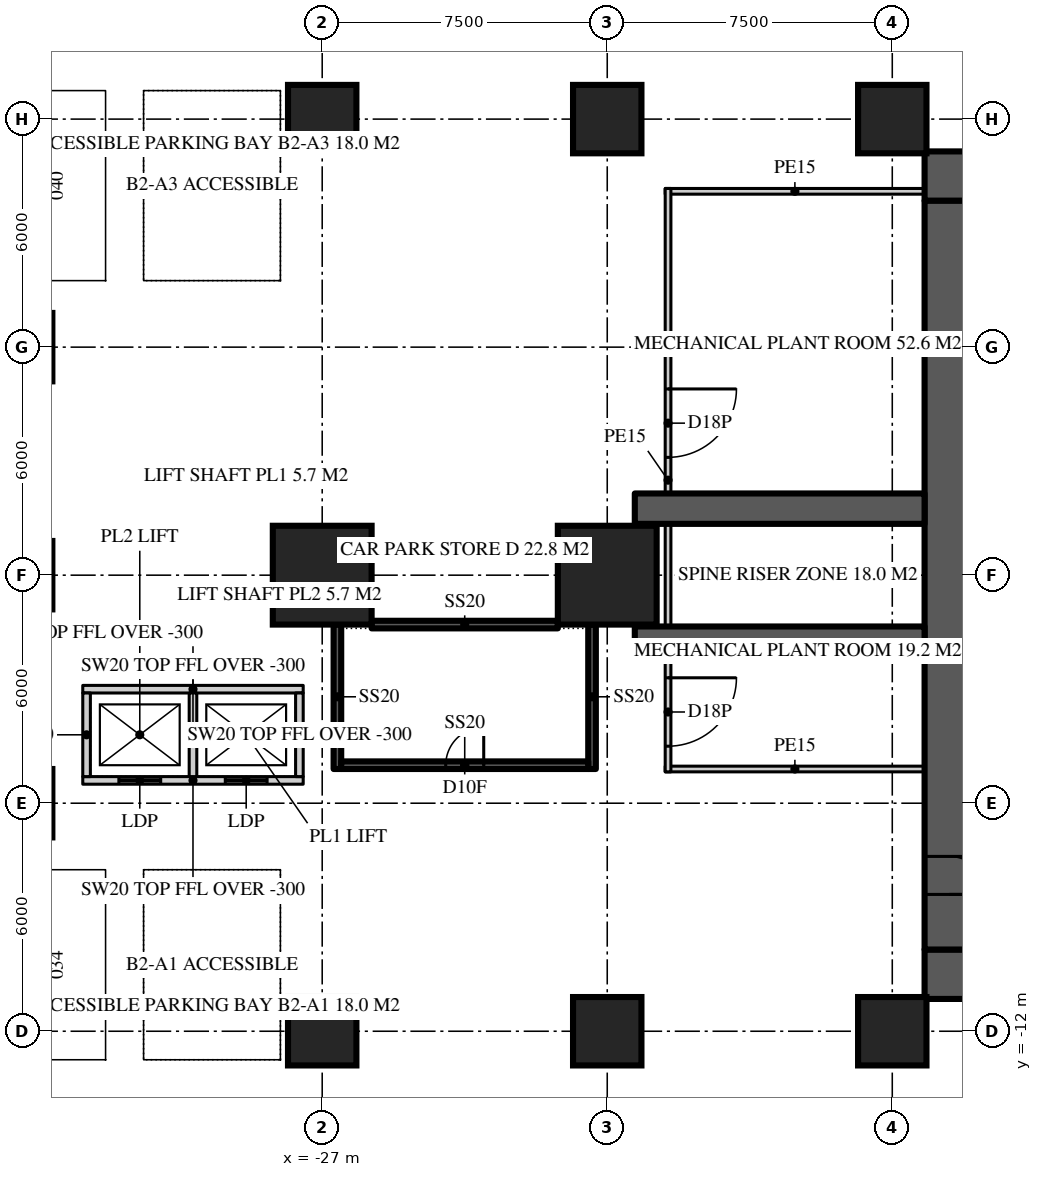
"""IFC4 building model, lengths in metres.
Left out: names, types, materials, properties, quantities, classifications, styles, units other than length and angle.
Written with IfcOpenShell. Run it as: python <this file> out.ifc"""

import sys

from ifc_helpers import new_model, si_unit, direction, frame, frame_2d, origin, origin_2d, place, context, subcontext, project, spatial, rectangle, extrude, element, fill, save


model = new_model("IFC4")
c1 = context("Model", 3, precision=1e-05, world=origin(), true_north=direction((0.0, 1.0)))
c2 = subcontext(c1, "Body", "Model", "MODEL_VIEW")
j1 = project(units=[si_unit("LENGTHUNIT", "METRE"), si_unit("PLANEANGLEUNIT", "RADIAN")], contexts=[c1])
p1 = place(None, origin())
s1 = spatial("IfcSite", under=j1, at=p1, CompositionType="ELEMENT")
p2 = place(p1, origin())
s2 = spatial("IfcBuilding", under=s1, at=p2, CompositionType="ELEMENT")
p3 = place(p2, frame((0.0, 0.0, -10.0)))
s3 = spatial("IfcBuildingStorey", under=s2, at=p3, CompositionType="ELEMENT", Elevation=-10.0)
p4 = place(p3, frame((-11.15, 10.5, 0.0), z_axis=(0.0, 0.0, 1.0), x_axis=(1.0, 0.0, 0.0)))
e1 = element("IfcWall", 1, at=p4, inside=s3, PredefinedType="SHEAR", context=c2, shape_type="SweptSolid", body=[
    extrude(rectangle(XDim=22.3, YDim=1.3, at=frame_2d((11.15, 0.0))), origin(), (0.0, 0.0, 1.0), 5.0),
])
p5 = place(p4, frame((4.25, 0.0, 0.0)))
e2 = element("IfcOpeningElement", 2, at=p5, cuts=e1, PredefinedType="OPENING", context=c2, shape_type="SweptSolid", body=[
    extrude(rectangle(XDim=1.8, YDim=2.2, at=frame_2d((0.9, 1.1))), frame((0.0, 0.66, 0.0), z_axis=(0.0, -1.0, 0.0), x_axis=(1.0, 0.0, 0.0)), (0.0, 0.0, 1.0), 1.32),
])
p6 = place(p4, frame((16.25, 0.0, 0.0)))
e3 = element("IfcOpeningElement", 3, at=p6, cuts=e1, PredefinedType="OPENING", context=c2, shape_type="SweptSolid", body=[
    extrude(rectangle(XDim=1.8, YDim=2.2, at=frame_2d((0.9, 1.1))), frame((0.0, 0.66, 0.0), z_axis=(0.0, -1.0, 0.0), x_axis=(1.0, 0.0, 0.0)), (0.0, 0.0, 1.0), 1.32),
])
p7 = place(p3, frame((11.15, -10.5, 0.0), z_axis=(0.0, 0.0, 1.0), x_axis=(-1.0, 0.0, 0.0)))
e4 = element("IfcWall", 4, at=p7, inside=s3, PredefinedType="SHEAR", context=c2, shape_type="SweptSolid", body=[
    extrude(rectangle(XDim=22.3, YDim=1.3, at=frame_2d((11.15, 0.0))), origin(), (0.0, 0.0, 1.0), 5.0),
])
p8 = place(p7, frame((16.25, 0.0, 0.0)))
e5 = element("IfcOpeningElement", 5, at=p8, cuts=e4, PredefinedType="OPENING", context=c2, shape_type="SweptSolid", body=[
    extrude(rectangle(XDim=1.8, YDim=2.2, at=frame_2d((0.9, 1.1))), frame((0.0, 0.66, 0.0), z_axis=(0.0, -1.0, 0.0), x_axis=(1.0, 0.0, 0.0)), (0.0, 0.0, 1.0), 1.32),
])
p9 = place(p7, frame((4.25, 0.0, 0.0)))
e6 = element("IfcOpeningElement", 6, at=p9, cuts=e4, PredefinedType="OPENING", context=c2, shape_type="SweptSolid", body=[
    extrude(rectangle(XDim=1.8, YDim=2.2, at=frame_2d((0.9, 1.1))), frame((0.0, 0.66, 0.0), z_axis=(0.0, -1.0, 0.0), x_axis=(1.0, 0.0, 0.0)), (0.0, 0.0, 1.0), 1.32),
])
p10 = place(p3, frame((-10.5, 9.85, 0.0), z_axis=(0.0, 0.0, 1.0), x_axis=(0.0, -1.0, 0.0)))
e7 = element("IfcWall", 7, at=p10, inside=s3, PredefinedType="SHEAR", context=c2, shape_type="SweptSolid", body=[
    extrude(rectangle(XDim=19.7, YDim=1.3, at=frame_2d((9.85, 0.0))), origin(), (0.0, 0.0, 1.0), 5.0),
])
p11 = place(p10, frame((17.25, 0.0, 0.0)))
e8 = element("IfcOpeningElement", 8, at=p11, cuts=e7, PredefinedType="OPENING", context=c2, shape_type="SweptSolid", body=[
    extrude(rectangle(XDim=1.0, YDim=2.2, at=frame_2d((0.5, 1.1))), frame((0.0, 0.66, 0.0), z_axis=(0.0, -1.0, 0.0), x_axis=(1.0, 0.0, 0.0)), (0.0, 0.0, 1.0), 1.32),
])
for number, where, z_axis, x_axis in (
    (9, (-11.15, 1.75, 0.0), (0.0, 0.0, 1.0), (-1.0, 0.0, 0.0)),
    (10, (-11.15, -1.75, 0.0), (0.0, 0.0, 1.0), (-1.0, 0.0, 0.0)),
):
    element("IfcWall", number, at=place(p3, frame(where, z_axis=z_axis, x_axis=x_axis)), inside=s3, PredefinedType="SHEAR", context=c2, shape_type="SweptSolid", body=[
        extrude(rectangle(XDim=7.625, YDim=0.8, at=frame_2d((3.812, 0.0))), origin(), (0.0, 0.0, 1.0), 5.0),
    ])
for number, where, z_axis, x_axis in (
    (11, (-27.0, -12.0, 0.0), (0.0, 0.0, 1.0), (1.0, 0.0, 0.0)),
    (12, (-19.5, -12.0, 0.0), (0.0, 0.0, 1.0), (1.0, 0.0, 0.0)),
    (13, (-12.0, -12.0, 0.0), (0.0, 0.0, 1.0), (1.0, 0.0, 0.0)),
    (14, (-35.0, -6.0, 0.0), (0.0, 0.0, 1.0), (1.0, 0.0, 0.0)),
    (15, (-35.0, 0.0, 0.0), (0.0, 0.0, 1.0), (1.0, 0.0, 0.0)),
):
    element("IfcColumn", number, at=place(p3, frame(where, z_axis=z_axis, x_axis=x_axis)), inside=s3, PredefinedType="COLUMN", context=c2, shape_type="SweptSolid", body=[
        extrude(rectangle(XDim=1.8, YDim=1.8, at=origin_2d()), origin(), (0.0, 0.0, 1.0), 5.0),
    ])
for number, where, z_axis, x_axis in (
    (16, (-27.0, 0.0, 0.0), (0.0, 0.0, 1.0), (1.0, 0.0, 0.0)),
    (17, (-19.5, 0.0, 0.0), (0.0, 0.0, 1.0), (1.0, 0.0, 0.0)),
):
    element("IfcColumn", number, at=place(p3, frame(where, z_axis=z_axis, x_axis=x_axis)), inside=s3, PredefinedType="COLUMN", context=c2, shape_type="SweptSolid", body=[
        extrude(rectangle(XDim=2.6, YDim=2.6, at=origin_2d()), origin(), (0.0, 0.0, 1.0), 5.0),
    ])
for number, where, z_axis, x_axis in (
    (18, (-35.0, 6.0, 0.0), (0.0, 0.0, 1.0), (1.0, 0.0, 0.0)),
    (19, (-27.0, 12.0, 0.0), (0.0, 0.0, 1.0), (1.0, 0.0, 0.0)),
    (20, (-19.5, 12.0, 0.0), (0.0, 0.0, 1.0), (1.0, 0.0, 0.0)),
    (21, (-12.0, 12.0, 0.0), (0.0, 0.0, 1.0), (1.0, 0.0, 0.0)),
):
    element("IfcColumn", number, at=place(p3, frame(where, z_axis=z_axis, x_axis=x_axis)), inside=s3, PredefinedType="COLUMN", context=c2, shape_type="SweptSolid", body=[
        extrude(rectangle(XDim=1.8, YDim=1.8, at=origin_2d()), origin(), (0.0, 0.0, 1.0), 5.0),
    ])
for number, where, z_axis, x_axis in (
    (22, (-11.15, 10.1, 0.0), (0.0, 0.0, 1.0), (-1.0, 0.0, 0.0)),
    (23, (-11.15, -5.1, 0.0), (0.0, 0.0, 1.0), (-1.0, 0.0, 0.0)),
):
    element("IfcWall", number, at=place(p3, frame(where, z_axis=z_axis, x_axis=x_axis)), inside=s3, PredefinedType="SOLIDWALL", context=c2, shape_type="SweptSolid", body=[
        extrude(rectangle(XDim=6.825, YDim=0.15, at=frame_2d((3.413, 0.0))), origin(), (0.0, 0.0, 1.0), 4.7),
    ])
p12 = place(p3, frame((-17.9, 10.175, 0.0), z_axis=(0.0, 0.0, 1.0), x_axis=(0.0, -1.0, 0.0)))
e24 = element("IfcWall", 24, at=p12, inside=s3, PredefinedType="SOLIDWALL", context=c2, shape_type="SweptSolid", body=[
    extrude(rectangle(XDim=15.35, YDim=0.15, at=frame_2d((7.675, 0.0))), origin(), (0.0, 0.0, 1.0), 4.7),
])
p13 = place(p12, frame((5.275, 0.0, 0.0)))
e25 = element("IfcOpeningElement", 25, at=p13, cuts=e24, PredefinedType="OPENING", context=c2, shape_type="SweptSolid", body=[
    extrude(rectangle(XDim=1.8, YDim=2.4, at=frame_2d((0.9, 1.2))), frame((0.0, 0.085, 0.0), z_axis=(0.0, -1.0, 0.0), x_axis=(1.0, 0.0, 0.0)), (0.0, 0.0, 1.0), 0.17),
])
p14 = place(p12, frame((12.875, 0.0, 0.0)))
e26 = element("IfcOpeningElement", 26, at=p14, cuts=e24, PredefinedType="OPENING", context=c2, shape_type="SweptSolid", body=[
    extrude(rectangle(XDim=1.8, YDim=2.4, at=frame_2d((0.9, 1.2))), frame((0.0, 0.085, 0.0), z_axis=(0.0, -1.0, 0.0), x_axis=(1.0, 0.0, 0.0)), (0.0, 0.0, 1.0), 0.17),
])
p15 = place(p3, frame((-27.5, -3.0, 0.0), z_axis=(0.0, 0.0, 1.0), x_axis=(-1.0, 0.0, 0.0)))
e27 = element("IfcWall", 27, at=p15, inside=s3, PredefinedType="SOLIDWALL", context=c2, shape_type="SweptSolid", body=[
    extrude(rectangle(XDim=5.8, YDim=0.2, at=frame_2d((2.9, 0.0))), origin(), (0.0, 0.0, 1.0), 4.7),
])
p16 = place(p3, frame((-33.3, -5.4, 0.0), z_axis=(0.0, 0.0, 1.0), x_axis=(1.0, 0.0, 0.0)))
e28 = element("IfcWall", 28, at=p16, inside=s3, PredefinedType="SOLIDWALL", context=c2, shape_type="SweptSolid", body=[
    extrude(rectangle(XDim=5.8, YDim=0.2, at=frame_2d((2.9, 0.0))), origin(), (0.0, 0.0, 1.0), 4.7),
])
p17 = place(p16, frame((3.75, 0.0, 0.0)))
e29 = element("IfcOpeningElement", 29, at=p17, cuts=e28, PredefinedType="OPENING", context=c2, shape_type="SweptSolid", body=[
    extrude(rectangle(XDim=1.1, YDim=2.2, at=frame_2d((0.55, 1.1))), frame((0.0, 0.11, 0.0), z_axis=(0.0, -1.0, 0.0), x_axis=(1.0, 0.0, 0.0)), (0.0, 0.0, 1.0), 0.22),
])
p18 = place(p16, frame((0.95, 0.0, 0.0)))
e30 = element("IfcOpeningElement", 30, at=p18, cuts=e28, PredefinedType="OPENING", context=c2, shape_type="SweptSolid", body=[
    extrude(rectangle(XDim=1.1, YDim=2.2, at=frame_2d((0.55, 1.1))), frame((0.0, 0.11, 0.0), z_axis=(0.0, -1.0, 0.0), x_axis=(1.0, 0.0, 0.0)), (0.0, 0.0, 1.0), 0.22),
])
for number, where, z_axis, x_axis in (
    (31, (-27.6, -3.1, 0.0), (0.0, 0.0, 1.0), (0.0, -1.0, 0.0)),
    (32, (-30.4, -3.1, 0.0), (0.0, 0.0, 1.0), (0.0, -1.0, 0.0)),
    (33, (-33.2, -3.1, 0.0), (0.0, 0.0, 1.0), (0.0, -1.0, 0.0)),
):
    element("IfcWall", number, at=place(p3, frame(where, z_axis=z_axis, x_axis=x_axis)), inside=s3, PredefinedType="SOLIDWALL", context=c2, shape_type="SweptSolid", body=[
        extrude(rectangle(XDim=2.2, YDim=0.2, at=frame_2d((1.1, 0.0))), origin(), (0.0, 0.0, 1.0), 4.7),
    ])
for number, where, z_axis, x_axis in (
    (34, (-19.9, -1.3, 0.0), (0.0, 0.0, 1.0), (0.0, -1.0, 0.0)),
    (35, (-26.6, -5.1, 0.0), (0.0, 0.0, 1.0), (0.0, 1.0, 0.0)),
):
    element("IfcWall", number, at=place(p3, frame(where, z_axis=z_axis, x_axis=x_axis)), inside=s3, PredefinedType="SOLIDWALL", context=c2, shape_type="SweptSolid", body=[
        extrude(rectangle(XDim=3.8, YDim=0.2, at=frame_2d((1.9, 0.0))), origin(), (0.0, 0.0, 1.0), 4.7),
    ])
p19 = place(p3, frame((-20.8, -1.3, 0.0), z_axis=(0.0, 0.0, 1.0), x_axis=(-1.0, 0.0, 0.0)))
e36 = element("IfcWall", 36, at=p19, inside=s3, PredefinedType="SOLIDWALL", context=c2, shape_type="SweptSolid", body=[
    extrude(rectangle(XDim=4.9, YDim=0.2, at=frame_2d((2.45, 0.0))), origin(), (0.0, 0.0, 1.0), 4.7),
])
p20 = place(p3, frame((-26.5, -5.0, 0.0), z_axis=(0.0, 0.0, 1.0), x_axis=(1.0, 0.0, 0.0)))
e37 = element("IfcWall", 37, at=p20, inside=s3, PredefinedType="SOLIDWALL", context=c2, shape_type="SweptSolid", body=[
    extrude(rectangle(XDim=6.5, YDim=0.2, at=frame_2d((3.25, 0.0))), origin(), (0.0, 0.0, 1.0), 4.7),
])
p21 = place(p20, frame((2.75, 0.0, 0.0)))
e38 = element("IfcOpeningElement", 38, at=p21, cuts=e37, PredefinedType="OPENING", context=c2, shape_type="SweptSolid", body=[
    extrude(rectangle(XDim=1.0, YDim=2.2, at=frame_2d((0.5, 1.1))), frame((0.0, 0.11, 0.0), z_axis=(0.0, -1.0, 0.0), x_axis=(1.0, 0.0, 0.0)), (0.0, 0.0, 1.0), 0.22),
])
p22 = place(p17, origin())
e39 = element("IfcDoor", 39, at=p22, inside=s3, OperationType="SLIDING_TO_LEFT", PredefinedType="DOOR", context=c2, shape_type="SweptSolid", body=[
    extrude(rectangle(XDim=1.1, YDim=2.2, at=frame_2d((0.55, 1.1))), frame((0.0, 0.025, 0.0), z_axis=(0.0, -1.0, 0.0), x_axis=(1.0, 0.0, 0.0)), (0.0, 0.0, 1.0), 0.05),
])
fill(e29, e39)
p23 = place(p18, origin())
e40 = element("IfcDoor", 40, at=p23, inside=s3, OperationType="SLIDING_TO_LEFT", PredefinedType="DOOR", context=c2, shape_type="SweptSolid", body=[
    extrude(rectangle(XDim=1.1, YDim=2.2, at=frame_2d((0.55, 1.1))), frame((0.0, 0.025, 0.0), z_axis=(0.0, -1.0, 0.0), x_axis=(1.0, 0.0, 0.0)), (0.0, 0.0, 1.0), 0.05),
])
fill(e30, e40)
p24 = place(p11, origin())
e41 = element("IfcDoor", 41, at=p24, inside=s3, OperationType="SINGLE_SWING_RIGHT", PredefinedType="DOOR", context=c2, shape_type="SweptSolid", body=[
    extrude(rectangle(XDim=1.0, YDim=2.2, at=frame_2d((0.5, 1.1))), frame((0.0, 0.025, 0.0), z_axis=(0.0, -1.0, 0.0), x_axis=(1.0, 0.0, 0.0)), (0.0, 0.0, 1.0), 0.05),
])
fill(e8, e41)
p25 = place(p13, origin())
e42 = element("IfcDoor", 42, at=p25, inside=s3, OperationType="DOUBLE_DOOR_DOUBLE_SWING", PredefinedType="DOOR", context=c2, shape_type="SweptSolid", body=[
    extrude(rectangle(XDim=1.8, YDim=2.4, at=frame_2d((0.9, 1.2))), frame((0.0, 0.025, 0.0), z_axis=(0.0, -1.0, 0.0), x_axis=(1.0, 0.0, 0.0)), (0.0, 0.0, 1.0), 0.05),
])
fill(e25, e42)
p26 = place(p14, origin())
e43 = element("IfcDoor", 43, at=p26, inside=s3, OperationType="DOUBLE_DOOR_DOUBLE_SWING", PredefinedType="DOOR", context=c2, shape_type="SweptSolid", body=[
    extrude(rectangle(XDim=1.8, YDim=2.4, at=frame_2d((0.9, 1.2))), frame((0.0, 0.025, 0.0), z_axis=(0.0, -1.0, 0.0), x_axis=(1.0, 0.0, 0.0)), (0.0, 0.0, 1.0), 0.05),
])
fill(e26, e43)
p27 = place(p21, origin())
e44 = element("IfcDoor", 44, at=p27, inside=s3, OperationType="SINGLE_SWING_RIGHT", PredefinedType="DOOR", context=c2, shape_type="SweptSolid", body=[
    extrude(rectangle(XDim=1.0, YDim=2.2, at=frame_2d((0.5, 1.1))), frame((0.0, 0.025, 0.0), z_axis=(0.0, -1.0, 0.0), x_axis=(1.0, 0.0, 0.0)), (0.0, 0.0, 1.0), 0.05),
])
fill(e38, e44)
save(model, sys.argv[1])
